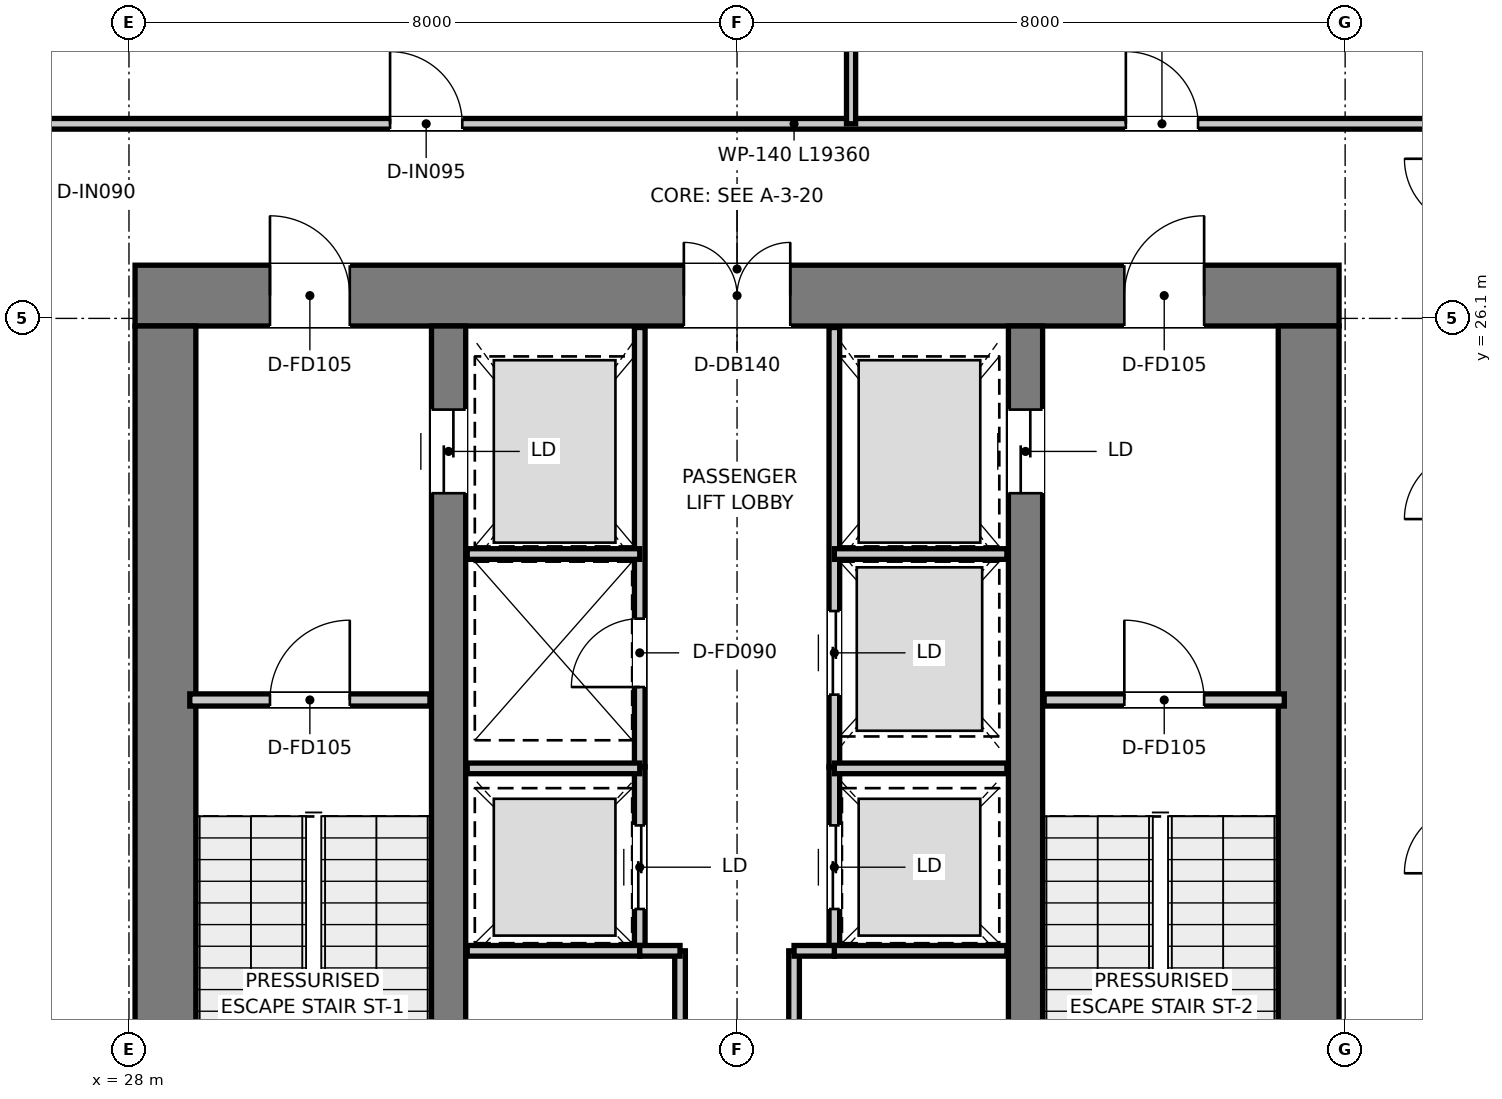
"""IFC4 building model, lengths in metres.
Left out: names, types, materials, properties, quantities, classifications, styles, units other than length and angle.
Written with IfcOpenShell. Run it as: python <this file> out.ifc"""

import sys

from ifc_helpers import new_model, si_unit, direction, frame, frame_2d, origin, place, context, subcontext, project, spatial, rectangle, extrude, element, fill, save


model = new_model("IFC4")
c1 = context("Model", 3, precision=1e-05, world=origin(), true_north=direction((0.0, 1.0)))
c2 = subcontext(c1, "Body", "Model", "MODEL_VIEW")
j1 = project(units=[si_unit("LENGTHUNIT", "METRE"), si_unit("PLANEANGLEUNIT", "RADIAN")], contexts=[c1])
p1 = place(None, origin())
s1 = spatial("IfcSite", under=j1, at=p1, CompositionType="ELEMENT")
p2 = place(p1, origin())
s2 = spatial("IfcBuilding", under=s1, at=p2, CompositionType="ELEMENT")
p3 = place(p2, frame((0.0, 0.0, 331.65)))
s3 = spatial("IfcBuildingStorey", under=s2, at=p3, CompositionType="ELEMENT", Elevation=331.65)
p4 = place(p3, frame((28.08, 26.4, 0.0), z_axis=(0.0, 0.0, 1.0), x_axis=(1.0, 0.0, 0.0)))
e1 = element("IfcWall", 1, at=p4, inside=s3, PredefinedType="SHEAR", context=c2, shape_type="SweptSolid", body=[
    extrude(rectangle(XDim=15.84, YDim=0.8, at=frame_2d((7.92, 0.0))), origin(), (0.0, 0.0, 1.0), 3.95),
])
p5 = place(p4, frame((7.22, 0.0, 0.0)))
e2 = element("IfcOpeningElement", 2, at=p5, cuts=e1, PredefinedType="OPENING", context=c2, shape_type="SweptSolid", body=[
    extrude(rectangle(XDim=1.4, YDim=2.2, at=frame_2d((0.7, 1.1))), frame((0.0, 0.41, 0.0), z_axis=(0.0, -1.0, 0.0), x_axis=(1.0, 0.0, 0.0)), (0.0, 0.0, 1.0), 0.82),
])
p6 = place(p4, frame((1.775, 0.0, 0.0)))
e3 = element("IfcOpeningElement", 3, at=p6, cuts=e1, PredefinedType="OPENING", context=c2, shape_type="SweptSolid", body=[
    extrude(rectangle(XDim=1.05, YDim=2.1, at=frame_2d((0.525, 1.05))), frame((0.0, 0.41, 0.0), z_axis=(0.0, -1.0, 0.0), x_axis=(1.0, 0.0, 0.0)), (0.0, 0.0, 1.0), 0.82),
])
p7 = place(p4, frame((13.015, 0.0, 0.0)))
e4 = element("IfcOpeningElement", 4, at=p7, cuts=e1, PredefinedType="OPENING", context=c2, shape_type="SweptSolid", body=[
    extrude(rectangle(XDim=1.05, YDim=2.1, at=frame_2d((0.525, 1.05))), frame((0.0, 0.41, 0.0), z_axis=(0.0, -1.0, 0.0), x_axis=(1.0, 0.0, 0.0)), (0.0, 0.0, 1.0), 0.82),
])
for number, where, z_axis, x_axis in (
    (5, (28.48, 11.3, 0.0), (0.0, 0.0, 1.0), (0.0, 1.0, 0.0)),
    (6, (43.52, 11.3, 0.0), (0.0, 0.0, 1.0), (0.0, 1.0, 0.0)),
):
    element("IfcWall", number, at=place(p3, frame(where, z_axis=z_axis, x_axis=x_axis)), inside=s3, PredefinedType="SHEAR", context=c2, shape_type="SweptSolid", body=[
        extrude(rectangle(XDim=14.7, YDim=0.8, at=frame_2d((7.35, 0.0))), origin(), (0.0, 0.0, 1.0), 3.95),
    ])
p8 = place(p3, frame((32.205, 13.22, 0.0), z_axis=(0.0, 0.0, 1.0), x_axis=(0.0, 1.0, 0.0)))
e7 = element("IfcWall", 7, at=p8, inside=s3, PredefinedType="SHEAR", context=c2, shape_type="SweptSolid", body=[
    extrude(rectangle(XDim=12.78, YDim=0.45, at=frame_2d((6.39, 0.0))), origin(), (0.0, 0.0, 1.0), 3.95),
])
p9 = place(p8, frame((10.58, 0.0, 0.0)))
e8 = element("IfcOpeningElement", 8, at=p9, cuts=e7, PredefinedType="OPENING", context=c2, shape_type="SweptSolid", body=[
    extrude(rectangle(XDim=1.1, YDim=2.15, at=frame_2d((0.55, 1.075))), frame((0.0, 0.235, 0.0), z_axis=(0.0, -1.0, 0.0), x_axis=(1.0, 0.0, 0.0)), (0.0, 0.0, 1.0), 0.47),
])
p10 = place(p3, frame((39.795, 13.22, 0.0), z_axis=(0.0, 0.0, 1.0), x_axis=(0.0, 1.0, 0.0)))
e9 = element("IfcWall", 9, at=p10, inside=s3, PredefinedType="SHEAR", context=c2, shape_type="SweptSolid", body=[
    extrude(rectangle(XDim=12.78, YDim=0.45, at=frame_2d((6.39, 0.0))), origin(), (0.0, 0.0, 1.0), 3.95),
])
p11 = place(p10, frame((10.58, 0.0, 0.0)))
e10 = element("IfcOpeningElement", 10, at=p11, cuts=e9, PredefinedType="OPENING", context=c2, shape_type="SweptSolid", body=[
    extrude(rectangle(XDim=1.1, YDim=2.15, at=frame_2d((0.55, 1.075))), frame((0.0, 0.235, 0.0), z_axis=(0.0, -1.0, 0.0), x_axis=(1.0, 0.0, 0.0)), (0.0, 0.0, 1.0), 0.47),
])
p12 = place(p3, frame((28.8, 21.08, 0.0), z_axis=(0.0, 0.0, 1.0), x_axis=(1.0, 0.0, 0.0)))
e11 = element("IfcWall", 11, at=p12, inside=s3, PredefinedType="PARTITIONING", context=c2, shape_type="SweptSolid", body=[
    extrude(rectangle(XDim=3.16, YDim=0.16, at=frame_2d((1.58, 0.0))), origin(), (0.0, 0.0, 1.0), 3.67),
])
p13 = place(p12, frame((1.055, 0.0, 0.0)))
e12 = element("IfcOpeningElement", 12, at=p13, cuts=e11, PredefinedType="OPENING", context=c2, shape_type="SweptSolid", body=[
    extrude(rectangle(XDim=1.05, YDim=2.1, at=frame_2d((0.525, 1.05))), frame((0.0, 0.09, 0.0), z_axis=(0.0, -1.0, 0.0), x_axis=(1.0, 0.0, 0.0)), (0.0, 0.0, 1.0), 0.18),
])
p14 = place(p3, frame((40.04, 21.08, 0.0), z_axis=(0.0, 0.0, 1.0), x_axis=(1.0, 0.0, 0.0)))
e13 = element("IfcWall", 13, at=p14, inside=s3, PredefinedType="PARTITIONING", context=c2, shape_type="SweptSolid", body=[
    extrude(rectangle(XDim=3.16, YDim=0.16, at=frame_2d((1.58, 0.0))), origin(), (0.0, 0.0, 1.0), 3.67),
])
p15 = place(p14, frame((1.055, 0.0, 0.0)))
e14 = element("IfcOpeningElement", 14, at=p15, cuts=e13, PredefinedType="OPENING", context=c2, shape_type="SweptSolid", body=[
    extrude(rectangle(XDim=1.05, YDim=2.1, at=frame_2d((0.525, 1.05))), frame((0.0, 0.09, 0.0), z_axis=(0.0, -1.0, 0.0), x_axis=(1.0, 0.0, 0.0)), (0.0, 0.0, 1.0), 0.18),
])
p16 = place(p3, frame((34.72, 20.2, 0.0), z_axis=(0.0, 0.0, 1.0), x_axis=(0.0, 1.0, 0.0)))
e15 = element("IfcWall", 15, at=p16, inside=s3, PredefinedType="PARTITIONING", context=c2, shape_type="SweptSolid", body=[
    extrude(rectangle(XDim=5.78, YDim=0.14, at=frame_2d((2.89, 0.0))), origin(), (0.0, 0.0, 1.0), 2.82),
])
p17 = place(p16, frame((1.05, 0.0, 0.0)))
e16 = element("IfcOpeningElement", 16, at=p17, cuts=e15, PredefinedType="OPENING", context=c2, shape_type="SweptSolid", body=[
    extrude(rectangle(XDim=0.9, YDim=2.1, at=frame_2d((0.45, 1.05))), frame((0.0, 0.08, 0.0), z_axis=(0.0, -1.0, 0.0), x_axis=(1.0, 0.0, 0.0)), (0.0, 0.0, 1.0), 0.16),
])
p18 = place(p3, frame((37.28, 20.2, 0.0), z_axis=(0.0, 0.0, 1.0), x_axis=(0.0, 1.0, 0.0)))
e17 = element("IfcWall", 17, at=p18, inside=s3, PredefinedType="PARTITIONING", context=c2, shape_type="SweptSolid", body=[
    extrude(rectangle(XDim=5.78, YDim=0.14, at=frame_2d((2.89, 0.0))), origin(), (0.0, 0.0, 1.0), 2.82),
])
p19 = place(p18, frame((0.95, 0.0, 0.0)))
e18 = element("IfcOpeningElement", 18, at=p19, cuts=e17, PredefinedType="OPENING", context=c2, shape_type="SweptSolid", body=[
    extrude(rectangle(XDim=1.1, YDim=2.15, at=frame_2d((0.55, 1.075))), frame((0.0, 0.08, 0.0), z_axis=(0.0, -1.0, 0.0), x_axis=(1.0, 0.0, 0.0)), (0.0, 0.0, 1.0), 0.16),
])
for number, where, z_axis, x_axis in (
    (19, (32.45, 23.0, 0.0), (0.0, 0.0, 1.0), (1.0, 0.0, 0.0)),
    (20, (37.28, 23.0, 0.0), (0.0, 0.0, 1.0), (1.0, 0.0, 0.0)),
):
    element("IfcWall", number, at=place(p3, frame(where, z_axis=z_axis, x_axis=x_axis)), inside=s3, PredefinedType="PARTITIONING", context=c2, shape_type="SweptSolid", body=[
        extrude(rectangle(XDim=2.27, YDim=0.14, at=frame_2d((1.135, 0.0))), origin(), (0.0, 0.0, 1.0), 2.82),
    ])
p20 = place(p3, frame((34.72, 17.78, 0.0), z_axis=(0.0, 0.0, 1.0), x_axis=(0.0, 1.0, 0.0)))
e21 = element("IfcWall", 21, at=p20, inside=s3, PredefinedType="PARTITIONING", context=c2, shape_type="SweptSolid", body=[
    extrude(rectangle(XDim=2.42, YDim=0.14, at=frame_2d((1.21, 0.0))), origin(), (0.0, 0.0, 1.0), 3.67),
])
p21 = place(p20, frame((0.55, 0.0, 0.0)))
e22 = element("IfcOpeningElement", 22, at=p21, cuts=e21, PredefinedType="OPENING", context=c2, shape_type="SweptSolid", body=[
    extrude(rectangle(XDim=1.1, YDim=2.15, at=frame_2d((0.55, 1.075))), frame((0.0, 0.08, 0.0), z_axis=(0.0, -1.0, 0.0), x_axis=(1.0, 0.0, 0.0)), (0.0, 0.0, 1.0), 0.16),
])
p22 = place(p3, frame((37.28, 17.78, 0.0), z_axis=(0.0, 0.0, 1.0), x_axis=(0.0, 1.0, 0.0)))
e23 = element("IfcWall", 23, at=p22, inside=s3, PredefinedType="PARTITIONING", context=c2, shape_type="SweptSolid", body=[
    extrude(rectangle(XDim=2.42, YDim=0.14, at=frame_2d((1.21, 0.0))), origin(), (0.0, 0.0, 1.0), 3.67),
])
p23 = place(p22, frame((0.55, 0.0, 0.0)))
e24 = element("IfcOpeningElement", 24, at=p23, cuts=e23, PredefinedType="OPENING", context=c2, shape_type="SweptSolid", body=[
    extrude(rectangle(XDim=1.1, YDim=2.15, at=frame_2d((0.55, 1.075))), frame((0.0, 0.08, 0.0), z_axis=(0.0, -1.0, 0.0), x_axis=(1.0, 0.0, 0.0)), (0.0, 0.0, 1.0), 0.16),
])
for number, where, z_axis, x_axis in (
    (25, (32.45, 17.78, 0.0), (0.0, 0.0, 1.0), (1.0, 0.0, 0.0)),
    (26, (32.45, 20.18, 0.0), (0.0, 0.0, 1.0), (1.0, 0.0, 0.0)),
    (27, (37.28, 17.78, 0.0), (0.0, 0.0, 1.0), (1.0, 0.0, 0.0)),
    (28, (37.28, 20.18, 0.0), (0.0, 0.0, 1.0), (1.0, 0.0, 0.0)),
):
    element("IfcWall", number, at=place(p3, frame(where, z_axis=z_axis, x_axis=x_axis)), inside=s3, PredefinedType="PARTITIONING", context=c2, shape_type="SweptSolid", body=[
        extrude(rectangle(XDim=2.27, YDim=0.14, at=frame_2d((1.135, 0.0))), origin(), (0.0, 0.0, 1.0), 3.67),
    ])
p24 = place(p3, frame((35.25, 13.22, 0.0), z_axis=(0.0, 0.0, 1.0), x_axis=(0.0, 1.0, 0.0)))
e29 = element("IfcWall", 29, at=p24, inside=s3, PredefinedType="PARTITIONING", context=c2, shape_type="SweptSolid", body=[
    extrude(rectangle(XDim=4.56, YDim=0.14, at=frame_2d((2.28, 0.0))), origin(), (0.0, 0.0, 1.0), 3.67),
])
p25 = place(p24, frame((1.93, 0.0, 0.0)))
e30 = element("IfcOpeningElement", 30, at=p25, cuts=e29, PredefinedType="OPENING", context=c2, shape_type="SweptSolid", body=[
    extrude(rectangle(XDim=0.9, YDim=2.1, at=frame_2d((0.45, 1.05))), frame((0.0, 0.08, 0.0), z_axis=(0.0, -1.0, 0.0), x_axis=(1.0, 0.0, 0.0)), (0.0, 0.0, 1.0), 0.16),
])
p26 = place(p3, frame((34.72, 17.78, 0.0), z_axis=(0.0, 0.0, 1.0), x_axis=(1.0, 0.0, 0.0)))
e31 = element("IfcWall", 31, at=p26, inside=s3, PredefinedType="PARTITIONING", context=c2, shape_type="SweptSolid", body=[
    extrude(rectangle(XDim=0.53, YDim=0.14, at=frame_2d((0.265, 0.0))), origin(), (0.0, 0.0, 1.0), 3.67),
])
p27 = place(p3, frame((36.75, 13.22, 0.0), z_axis=(0.0, 0.0, 1.0), x_axis=(0.0, 1.0, 0.0)))
e32 = element("IfcWall", 32, at=p27, inside=s3, PredefinedType="PARTITIONING", context=c2, shape_type="SweptSolid", body=[
    extrude(rectangle(XDim=4.56, YDim=0.14, at=frame_2d((2.28, 0.0))), origin(), (0.0, 0.0, 1.0), 3.67),
])
p28 = place(p27, frame((1.93, 0.0, 0.0)))
e33 = element("IfcOpeningElement", 33, at=p28, cuts=e32, PredefinedType="OPENING", context=c2, shape_type="SweptSolid", body=[
    extrude(rectangle(XDim=0.9, YDim=2.1, at=frame_2d((0.45, 1.05))), frame((0.0, 0.08, 0.0), z_axis=(0.0, -1.0, 0.0), x_axis=(1.0, 0.0, 0.0)), (0.0, 0.0, 1.0), 0.16),
])
p29 = place(p3, frame((36.75, 17.78, 0.0), z_axis=(0.0, 0.0, 1.0), x_axis=(1.0, 0.0, 0.0)))
e34 = element("IfcWall", 34, at=p29, inside=s3, PredefinedType="PARTITIONING", context=c2, shape_type="SweptSolid", body=[
    extrude(rectangle(XDim=0.53, YDim=0.14, at=frame_2d((0.265, 0.0))), origin(), (0.0, 0.0, 1.0), 3.67),
])
p30 = place(p3, frame((26.32, 28.66, 0.0), z_axis=(0.0, 0.0, 1.0), x_axis=(1.0, 0.0, 0.0)))
e35 = element("IfcWall", 35, at=p30, inside=s3, PredefinedType="PARTITIONING", context=c2, shape_type="SweptSolid", body=[
    extrude(rectangle(XDim=19.36, YDim=0.14, at=frame_2d((9.68, 0.0))), origin(), (0.0, 0.0, 1.0), 3.18),
])
p31 = place(p30, frame((5.115, 0.0, 0.0)))
e36 = element("IfcOpeningElement", 36, at=p31, cuts=e35, PredefinedType="OPENING", context=c2, shape_type="SweptSolid", body=[
    extrude(rectangle(XDim=0.95, YDim=2.1, at=frame_2d((0.475, 1.05))), frame((0.0, 0.08, 0.0), z_axis=(0.0, -1.0, 0.0), x_axis=(1.0, 0.0, 0.0)), (0.0, 0.0, 1.0), 0.16),
])
p32 = place(p30, frame((14.795, 0.0, 0.0)))
e37 = element("IfcOpeningElement", 37, at=p32, cuts=e35, PredefinedType="OPENING", context=c2, shape_type="SweptSolid", body=[
    extrude(rectangle(XDim=0.95, YDim=2.1, at=frame_2d((0.475, 1.05))), frame((0.0, 0.08, 0.0), z_axis=(0.0, -1.0, 0.0), x_axis=(1.0, 0.0, 0.0)), (0.0, 0.0, 1.0), 0.16),
])
p33 = place(p3, frame((37.5, 28.66, 0.0), z_axis=(0.0, 0.0, 1.0), x_axis=(0.0, 1.0, 0.0)))
e38 = element("IfcWall", 38, at=p33, inside=s3, PredefinedType="PARTITIONING", context=c2, shape_type="SweptSolid", body=[
    extrude(rectangle(XDim=18.69, YDim=0.12, at=frame_2d((9.345, 0.0))), origin(), (0.0, 0.0, 1.0), 3.13),
])
p34 = place(p13, origin())
e39 = element("IfcDoor", 39, at=p34, inside=s3, OperationType="SINGLE_SWING_RIGHT", PredefinedType="DOOR", context=c2, shape_type="SweptSolid", body=[
    extrude(rectangle(XDim=1.05, YDim=2.1, at=frame_2d((0.525, 1.05))), frame((0.0, 0.025, 0.0), z_axis=(0.0, -1.0, 0.0), x_axis=(1.0, 0.0, 0.0)), (0.0, 0.0, 1.0), 0.05),
])
fill(e12, e39)
p35 = place(p15, origin())
e40 = element("IfcDoor", 40, at=p35, inside=s3, OperationType="SINGLE_SWING_LEFT", PredefinedType="DOOR", context=c2, shape_type="SweptSolid", body=[
    extrude(rectangle(XDim=1.05, YDim=2.1, at=frame_2d((0.525, 1.05))), frame((0.0, 0.025, 0.0), z_axis=(0.0, -1.0, 0.0), x_axis=(1.0, 0.0, 0.0)), (0.0, 0.0, 1.0), 0.05),
])
fill(e14, e40)
p36 = place(p5, origin())
e41 = element("IfcDoor", 41, at=p36, inside=s3, OperationType="DOUBLE_DOOR_SINGLE_SWING", PredefinedType="DOOR", context=c2, shape_type="SweptSolid", body=[
    extrude(rectangle(XDim=1.4, YDim=2.2, at=frame_2d((0.7, 1.1))), frame((0.0, 0.025, 0.0), z_axis=(0.0, -1.0, 0.0), x_axis=(1.0, 0.0, 0.0)), (0.0, 0.0, 1.0), 0.05),
])
fill(e2, e41)
p37 = place(p6, origin())
e42 = element("IfcDoor", 42, at=p37, inside=s3, OperationType="SINGLE_SWING_LEFT", PredefinedType="DOOR", context=c2, shape_type="SweptSolid", body=[
    extrude(rectangle(XDim=1.05, YDim=2.1, at=frame_2d((0.525, 1.05))), frame((0.0, 0.025, 0.0), z_axis=(0.0, -1.0, 0.0), x_axis=(1.0, 0.0, 0.0)), (0.0, 0.0, 1.0), 0.05),
])
fill(e3, e42)
p38 = place(p7, origin())
e43 = element("IfcDoor", 43, at=p38, inside=s3, OperationType="SINGLE_SWING_RIGHT", PredefinedType="DOOR", context=c2, shape_type="SweptSolid", body=[
    extrude(rectangle(XDim=1.05, YDim=2.1, at=frame_2d((0.525, 1.05))), frame((0.0, 0.025, 0.0), z_axis=(0.0, -1.0, 0.0), x_axis=(1.0, 0.0, 0.0)), (0.0, 0.0, 1.0), 0.05),
])
fill(e4, e43)
p39 = place(p9, origin())
e44 = element("IfcDoor", 44, at=p39, inside=s3, OperationType="DOUBLE_DOOR_SLIDING", PredefinedType="DOOR", context=c2, shape_type="SweptSolid", body=[
    extrude(rectangle(XDim=1.1, YDim=2.15, at=frame_2d((0.55, 1.075))), frame((0.0, 0.025, 0.0), z_axis=(0.0, -1.0, 0.0), x_axis=(1.0, 0.0, 0.0)), (0.0, 0.0, 1.0), 0.05),
])
fill(e8, e44)
p40 = place(p11, origin())
e45 = element("IfcDoor", 45, at=p40, inside=s3, OperationType="DOUBLE_DOOR_SLIDING", PredefinedType="DOOR", context=c2, shape_type="SweptSolid", body=[
    extrude(rectangle(XDim=1.1, YDim=2.15, at=frame_2d((0.55, 1.075))), frame((0.0, 0.025, 0.0), z_axis=(0.0, -1.0, 0.0), x_axis=(1.0, 0.0, 0.0)), (0.0, 0.0, 1.0), 0.05),
])
fill(e10, e45)
p41 = place(p17, origin())
e46 = element("IfcDoor", 46, at=p41, inside=s3, OperationType="SINGLE_SWING_LEFT", PredefinedType="DOOR", context=c2, shape_type="SweptSolid", body=[
    extrude(rectangle(XDim=0.9, YDim=2.1, at=frame_2d((0.45, 1.05))), frame((0.0, 0.025, 0.0), z_axis=(0.0, -1.0, 0.0), x_axis=(1.0, 0.0, 0.0)), (0.0, 0.0, 1.0), 0.05),
])
fill(e16, e46)
p42 = place(p19, origin())
e47 = element("IfcDoor", 47, at=p42, inside=s3, OperationType="DOUBLE_DOOR_SLIDING", PredefinedType="DOOR", context=c2, shape_type="SweptSolid", body=[
    extrude(rectangle(XDim=1.1, YDim=2.15, at=frame_2d((0.55, 1.075))), frame((0.0, 0.025, 0.0), z_axis=(0.0, -1.0, 0.0), x_axis=(1.0, 0.0, 0.0)), (0.0, 0.0, 1.0), 0.05),
])
fill(e18, e47)
p43 = place(p21, origin())
e48 = element("IfcDoor", 48, at=p43, inside=s3, OperationType="DOUBLE_DOOR_SLIDING", PredefinedType="DOOR", context=c2, shape_type="SweptSolid", body=[
    extrude(rectangle(XDim=1.1, YDim=2.15, at=frame_2d((0.55, 1.075))), frame((0.0, 0.025, 0.0), z_axis=(0.0, -1.0, 0.0), x_axis=(1.0, 0.0, 0.0)), (0.0, 0.0, 1.0), 0.05),
])
fill(e22, e48)
p44 = place(p23, origin())
e49 = element("IfcDoor", 49, at=p44, inside=s3, OperationType="DOUBLE_DOOR_SLIDING", PredefinedType="DOOR", context=c2, shape_type="SweptSolid", body=[
    extrude(rectangle(XDim=1.1, YDim=2.15, at=frame_2d((0.55, 1.075))), frame((0.0, 0.025, 0.0), z_axis=(0.0, -1.0, 0.0), x_axis=(1.0, 0.0, 0.0)), (0.0, 0.0, 1.0), 0.05),
])
fill(e24, e49)
p45 = place(p31, origin())
e50 = element("IfcDoor", 50, at=p45, inside=s3, OperationType="SINGLE_SWING_LEFT", PredefinedType="DOOR", context=c2, shape_type="SweptSolid", body=[
    extrude(rectangle(XDim=0.95, YDim=2.1, at=frame_2d((0.475, 1.05))), frame((0.0, 0.025, 0.0), z_axis=(0.0, -1.0, 0.0), x_axis=(1.0, 0.0, 0.0)), (0.0, 0.0, 1.0), 0.05),
])
fill(e36, e50)
p46 = place(p32, origin())
e51 = element("IfcDoor", 51, at=p46, inside=s3, OperationType="SINGLE_SWING_LEFT", PredefinedType="DOOR", context=c2, shape_type="SweptSolid", body=[
    extrude(rectangle(XDim=0.95, YDim=2.1, at=frame_2d((0.475, 1.05))), frame((0.0, 0.025, 0.0), z_axis=(0.0, -1.0, 0.0), x_axis=(1.0, 0.0, 0.0)), (0.0, 0.0, 1.0), 0.05),
])
fill(e37, e51)
save(model, sys.argv[1])
